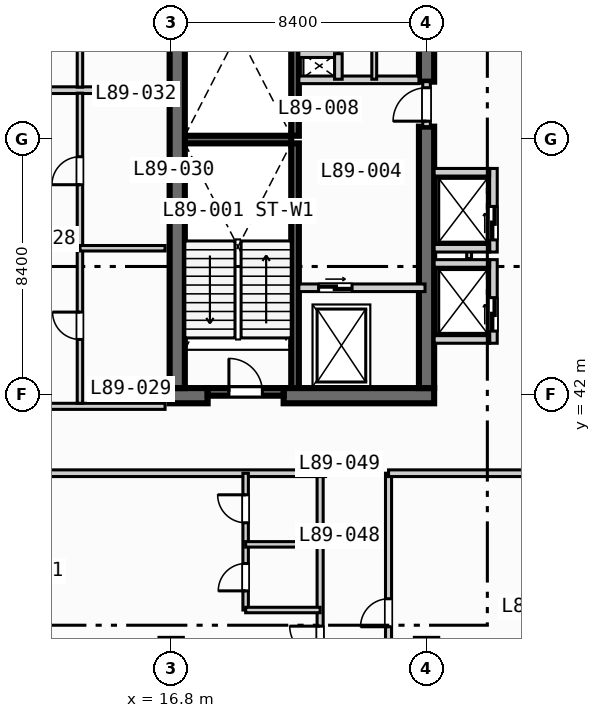
"""IFC4 building model, lengths in metres.
Left out: names, types, materials, properties, quantities, classifications, styles, units other than length and angle.
Written with IfcOpenShell. Run it as: python <this file> out.ifc"""

import sys

from ifc_helpers import new_model, si_unit, direction, frame, frame_2d, origin, place, context, subcontext, project, spatial, rectangle, extrude, element, fill, save


model = new_model("IFC4")
c1 = context("Model", 3, precision=1e-05, world=origin(), true_north=direction((0.0, 1.0)))
c2 = subcontext(c1, "Body", "Model", "MODEL_VIEW")
j1 = project(units=[si_unit("LENGTHUNIT", "METRE"), si_unit("PLANEANGLEUNIT", "RADIAN")], contexts=[c1])
p1 = place(None, origin())
s1 = spatial("IfcSite", under=j1, at=p1, CompositionType="ELEMENT")
p2 = place(p1, origin())
s2 = spatial("IfcBuilding", under=s1, at=p2, CompositionType="ELEMENT")
p3 = place(p2, frame((0.0, 0.0, 359.6)))
s3 = spatial("IfcBuildingStorey", under=s2, at=p3, CompositionType="ELEMENT", Elevation=359.6)
for number, where, z_axis, x_axis in (
    (1, (20.875, 42.2, 0.0), (0.0, 0.0, 1.0), (0.0, 1.0, 0.0)),
    (2, (20.875, 50.5, 0.0), (0.0, 0.0, 1.0), (0.0, 1.0, 0.0)),
):
    element("IfcWall", number, at=place(p3, frame(where, z_axis=z_axis, x_axis=x_axis)), inside=s3, PredefinedType="SOLIDWALL", context=c2, shape_type="SweptSolid", body=[
        extrude(rectangle(XDim=8.05, YDim=0.25, at=frame_2d((4.025, 0.0))), origin(), (0.0, 0.0, 1.0), 3.9),
    ])
p4 = place(p3, frame((17.25, 50.375, 0.0), z_axis=(0.0, 0.0, 1.0), x_axis=(1.0, 0.0, 0.0)))
e3 = element("IfcWall", 3, at=p4, inside=s3, PredefinedType="SOLIDWALL", context=c2, shape_type="SweptSolid", body=[
    extrude(rectangle(XDim=3.5, YDim=0.25, at=frame_2d((1.75, 0.0))), origin(), (0.0, 0.0, 1.0), 3.9),
])
p5 = place(p3, frame((16.75, 41.95, 0.0), z_axis=(0.0, 0.0, 1.0), x_axis=(1.0, 0.0, 0.0)))
e4 = element("IfcWall", 4, at=p5, inside=s3, PredefinedType="SHEAR", context=c2, shape_type="SweptSolid", body=[
    extrude(rectangle(XDim=1.25, YDim=0.5, at=frame_2d((0.625, 0.0))), origin(), (0.0, 0.0, 1.0), 3.9),
])
p6 = place(p3, frame((20.5, 41.95, 0.0), z_axis=(0.0, 0.0, 1.0), x_axis=(1.0, 0.0, 0.0)))
e5 = element("IfcWall", 5, at=p6, inside=s3, PredefinedType="SHEAR", context=c2, shape_type="SweptSolid", body=[
    extrude(rectangle(XDim=4.95, YDim=0.5, at=frame_2d((2.475, 0.0))), origin(), (0.0, 0.0, 1.0), 3.9),
])
p7 = place(p3, frame((17.0, 42.2, 0.0), z_axis=(0.0, 0.0, 1.0), x_axis=(0.0, 1.0, 0.0)))
e6 = element("IfcWall", 6, at=p7, inside=s3, PredefinedType="SHEAR", context=c2, shape_type="SweptSolid", body=[
    extrude(rectangle(XDim=16.35, YDim=0.5, at=frame_2d((8.175, 0.0))), origin(), (0.0, 0.0, 1.0), 3.9),
])
p8 = place(p3, frame((25.2, 42.2, 0.0), z_axis=(0.0, 0.0, 1.0), x_axis=(0.0, 1.0, 0.0)))
e7 = element("IfcWall", 7, at=p8, inside=s3, PredefinedType="SHEAR", context=c2, shape_type="SweptSolid", body=[
    extrude(rectangle(XDim=8.6, YDim=0.5, at=frame_2d((4.3, 0.0))), origin(), (0.0, 0.0, 1.0), 3.9),
])
p9 = place(p3, frame((25.2, 52.28, 0.0), z_axis=(0.0, 0.0, 1.0), x_axis=(0.0, 1.0, 0.0)))
e8 = element("IfcWall", 8, at=p9, inside=s3, PredefinedType="SHEAR", context=c2, shape_type="SweptSolid", body=[
    extrude(rectangle(XDim=1.27, YDim=0.5, at=frame_2d((0.635, 0.0))), origin(), (0.0, 0.0, 1.0), 3.9),
])
p10 = place(p3, frame((18.0, 42.075, 0.0), z_axis=(0.0, 0.0, 1.0), x_axis=(1.0, 0.0, 0.0)))
e9 = element("IfcWall", 9, at=p10, inside=s3, PredefinedType="SOLIDWALL", context=c2, shape_type="SweptSolid", body=[
    extrude(rectangle(XDim=2.5, YDim=0.25, at=frame_2d((1.25, 0.0))), origin(), (0.0, 0.0, 1.0), 3.9),
])
p11 = place(p10, frame((0.7, 0.0, 0.0)))
e10 = element("IfcOpeningElement", 10, at=p11, cuts=e9, PredefinedType="OPENING", context=c2, shape_type="SweptSolid", body=[
    extrude(rectangle(XDim=1.1, YDim=2.15, at=frame_2d((0.55, 1.075))), frame((0.0, 0.135, 0.0), z_axis=(0.0, -1.0, 0.0), x_axis=(1.0, 0.0, 0.0)), (0.0, 0.0, 1.0), 0.27),
])
p12 = place(p3, frame((21.0, 45.5, 0.0), z_axis=(0.0, 0.0, 1.0), x_axis=(1.0, 0.0, 0.0)))
e11 = element("IfcWall", 11, at=p12, inside=s3, PredefinedType="SOLIDWALL", context=c2, shape_type="SweptSolid", body=[
    extrude(rectangle(XDim=4.15, YDim=0.25, at=frame_2d((2.075, 0.0))), origin(), (0.0, 0.0, 1.0), 3.9),
])
p13 = place(p12, frame((0.65, 0.0, 0.0)))
e12 = element("IfcOpeningElement", 12, at=p13, cuts=e11, PredefinedType="OPENING", context=c2, shape_type="SweptSolid", body=[
    extrude(rectangle(XDim=1.1, YDim=2.15, at=frame_2d((0.55, 1.075))), frame((0.0, 0.135, 0.0), z_axis=(0.0, -1.0, 0.0), x_axis=(1.0, 0.0, 0.0)), (0.0, 0.0, 1.0), 0.27),
])
p14 = place(p3, frame((25.2, 50.8, 0.0), z_axis=(0.0, 0.0, 1.0), x_axis=(0.0, 1.0, 0.0)))
e13 = element("IfcWall", 13, at=p14, inside=s3, PredefinedType="SOLIDWALL", context=c2, shape_type="SweptSolid", body=[
    extrude(rectangle(XDim=1.48, YDim=0.25, at=frame_2d((0.74, 0.0))), origin(), (0.0, 0.0, 1.0), 3.9),
])
p15 = place(p14, frame((0.18, 0.0, 0.0)))
e14 = element("IfcOpeningElement", 14, at=p15, cuts=e13, PredefinedType="OPENING", context=c2, shape_type="SweptSolid", body=[
    extrude(rectangle(XDim=1.1, YDim=2.15, at=frame_2d((0.55, 1.075))), frame((0.0, 0.135, 0.0), z_axis=(0.0, -1.0, 0.0), x_axis=(1.0, 0.0, 0.0)), (0.0, 0.0, 1.0), 0.27),
])
p16 = place(p3, frame((21.0, 52.34, 0.0), z_axis=(0.0, 0.0, 1.0), x_axis=(1.0, 0.0, 0.0)))
e15 = element("IfcWall", 15, at=p16, inside=s3, PredefinedType="SOLIDWALL", context=c2, shape_type="SweptSolid", body=[
    extrude(rectangle(XDim=3.95, YDim=0.25, at=frame_2d((1.975, 0.0))), origin(), (0.0, 0.0, 1.0), 3.9),
])
p17 = place(p3, frame((21.0, 53.2, 0.0), z_axis=(0.0, 0.0, 1.0), x_axis=(1.0, 0.0, 0.0)))
e16 = element("IfcWall", 16, at=p17, inside=s3, PredefinedType="SOLIDWALL", context=c2, shape_type="SweptSolid", body=[
    extrude(rectangle(XDim=1.3, YDim=0.25, at=frame_2d((0.65, 0.0))), origin(), (0.0, 0.0, 1.0), 3.9),
])
p18 = place(p3, frame((22.3, 52.36, 0.0), z_axis=(0.0, 0.0, 1.0), x_axis=(0.0, 1.0, 0.0)))
e17 = element("IfcWall", 17, at=p18, inside=s3, PredefinedType="SOLIDWALL", context=c2, shape_type="SweptSolid", body=[
    extrude(rectangle(XDim=0.84, YDim=0.25, at=frame_2d((0.42, 0.0))), origin(), (0.0, 0.0, 1.0), 3.9),
])
p19 = place(p3, frame((23.48, 52.36, 0.0), z_axis=(0.0, 0.0, 1.0), x_axis=(0.0, 1.0, 0.0)))
e18 = element("IfcWall", 18, at=p19, inside=s3, PredefinedType="PARTITIONING", context=c2, shape_type="SweptSolid", body=[
    extrude(rectangle(XDim=1.1, YDim=0.16, at=frame_2d((0.55, 0.0))), origin(), (0.0, 0.0, 1.0), 3.9),
])
p20 = place(p3, frame((27.4, 43.675, 0.0), z_axis=(0.0, 0.0, 1.0), x_axis=(0.0, 1.0, 0.0)))
e19 = element("IfcWall", 19, at=p20, inside=s3, PredefinedType="SOLIDWALL", context=c2, shape_type="SweptSolid", body=[
    extrude(rectangle(XDim=2.75, YDim=0.25, at=frame_2d((1.375, 0.0))), origin(), (0.0, 0.0, 1.0), 3.9),
])
p21 = place(p20, frame((0.4, 0.0, 0.0)))
e20 = element("IfcOpeningElement", 20, at=p21, cuts=e19, PredefinedType="OPENING", context=c2, shape_type="SweptSolid", body=[
    extrude(rectangle(XDim=1.1, YDim=2.15, at=frame_2d((0.55, 1.075))), frame((0.0, 0.135, 0.0), z_axis=(0.0, -1.0, 0.0), x_axis=(1.0, 0.0, 0.0)), (0.0, 0.0, 1.0), 0.27),
])
for number, where, z_axis, x_axis in (
    (21, (25.45, 43.8, 0.0), (0.0, 0.0, 1.0), (1.0, 0.0, 0.0)),
    (22, (25.45, 46.3, 0.0), (0.0, 0.0, 1.0), (1.0, 0.0, 0.0)),
):
    element("IfcWall", number, at=place(p3, frame(where, z_axis=z_axis, x_axis=x_axis)), inside=s3, PredefinedType="SOLIDWALL", context=c2, shape_type="SweptSolid", body=[
        extrude(rectangle(XDim=1.825, YDim=0.25, at=frame_2d((0.913, 0.0))), origin(), (0.0, 0.0, 1.0), 3.9),
    ])
p22 = place(p3, frame((26.6, 46.46, 0.0), z_axis=(0.0, 0.0, 1.0), x_axis=(0.0, 1.0, 0.0)))
e23 = element("IfcWall", 23, at=p22, inside=s3, PredefinedType="PARTITIONING", context=c2, shape_type="SweptSolid", body=[
    extrude(rectangle(XDim=0.88, YDim=0.16, at=frame_2d((0.44, 0.0))), origin(), (0.0, 0.0, 1.0), 3.9),
])
p23 = place(p3, frame((27.4, 46.675, 0.0), z_axis=(0.0, 0.0, 1.0), x_axis=(0.0, 1.0, 0.0)))
e24 = element("IfcWall", 24, at=p23, inside=s3, PredefinedType="SOLIDWALL", context=c2, shape_type="SweptSolid", body=[
    extrude(rectangle(XDim=2.75, YDim=0.25, at=frame_2d((1.375, 0.0))), origin(), (0.0, 0.0, 1.0), 3.9),
])
p24 = place(p23, frame((0.4, 0.0, 0.0)))
e25 = element("IfcOpeningElement", 25, at=p24, cuts=e24, PredefinedType="OPENING", context=c2, shape_type="SweptSolid", body=[
    extrude(rectangle(XDim=1.1, YDim=2.15, at=frame_2d((0.55, 1.075))), frame((0.0, 0.135, 0.0), z_axis=(0.0, -1.0, 0.0), x_axis=(1.0, 0.0, 0.0)), (0.0, 0.0, 1.0), 0.27),
])
for number, where, z_axis, x_axis in (
    (26, (25.45, 46.8, 0.0), (0.0, 0.0, 1.0), (1.0, 0.0, 0.0)),
    (27, (25.45, 49.3, 0.0), (0.0, 0.0, 1.0), (1.0, 0.0, 0.0)),
):
    element("IfcWall", number, at=place(p3, frame(where, z_axis=z_axis, x_axis=x_axis)), inside=s3, PredefinedType="SOLIDWALL", context=c2, shape_type="SweptSolid", body=[
        extrude(rectangle(XDim=1.825, YDim=0.25, at=frame_2d((0.913, 0.0))), origin(), (0.0, 0.0, 1.0), 3.9),
    ])
p25 = place(p3, frame((23.95, 30.6, 0.0), z_axis=(0.0, 0.0, 1.0), x_axis=(0.0, 1.0, 0.0)))
e28 = element("IfcWall", 28, at=p25, inside=s3, PredefinedType="PARTITIONING", context=c2, shape_type="SweptSolid", body=[
    extrude(rectangle(XDim=8.8, YDim=0.2, at=frame_2d((4.4, 0.0))), origin(), (0.0, 0.0, 1.0), 3.9),
])
p26 = place(p25, frame((3.75, 0.0, 0.0)))
e29 = element("IfcOpeningElement", 29, at=p26, cuts=e28, PredefinedType="OPENING", context=c2, shape_type="SweptSolid", body=[
    extrude(rectangle(XDim=0.92, YDim=2.1, at=frame_2d((0.46, 1.05))), frame((0.0, 0.11, 0.0), z_axis=(0.0, -1.0, 0.0), x_axis=(1.0, 0.0, 0.0)), (0.0, 0.0, 1.0), 0.22),
])
p27 = place(p3, frame((23.95, 39.4, 0.0), z_axis=(0.0, 0.0, 1.0), x_axis=(1.0, 0.0, 0.0)))
e30 = element("IfcWall", 30, at=p27, inside=s3, PredefinedType="PARTITIONING", context=c2, shape_type="SweptSolid", body=[
    extrude(rectangle(XDim=9.35, YDim=0.22, at=frame_2d((4.675, 0.0))), origin(), (0.0, 0.0, 1.0), 3.9),
])
p28 = place(p3, frame((8.65, 41.6, 0.0), z_axis=(0.0, 0.0, 1.0), x_axis=(1.0, 0.0, 0.0)))
e31 = element("IfcWall", 31, at=p28, inside=s3, PredefinedType="PARTITIONING", context=c2, shape_type="SweptSolid", body=[
    extrude(rectangle(XDim=7.95, YDim=0.2, at=frame_2d((3.975, 0.0))), origin(), (0.0, 0.0, 1.0), 3.9),
])
p29 = place(p28, frame((2.0, 0.0, 0.0)))
e32 = element("IfcOpeningElement", 32, at=p29, cuts=e31, PredefinedType="OPENING", context=c2, shape_type="SweptSolid", body=[
    extrude(rectangle(XDim=1.0, YDim=2.15, at=frame_2d((0.5, 1.075))), frame((0.0, 0.11, 0.0), z_axis=(0.0, -1.0, 0.0), x_axis=(1.0, 0.0, 0.0)), (0.0, 0.0, 1.0), 0.22),
])
p30 = place(p3, frame((8.65, 52.0, 0.0), z_axis=(0.0, 0.0, 1.0), x_axis=(1.0, 0.0, 0.0)))
e33 = element("IfcWall", 33, at=p30, inside=s3, PredefinedType="PARTITIONING", context=c2, shape_type="SweptSolid", body=[
    extrude(rectangle(XDim=7.95, YDim=0.22, at=frame_2d((3.975, 0.0))), origin(), (0.0, 0.0, 1.0), 3.9),
])
p31 = place(p3, frame((13.8, 41.7, 0.0), z_axis=(0.0, 0.0, 1.0), x_axis=(0.0, 1.0, 0.0)))
e34 = element("IfcWall", 34, at=p31, inside=s3, PredefinedType="PLUMBINGWALL", context=c2, shape_type="SweptSolid", body=[
    extrude(rectangle(XDim=10.2, YDim=0.18, at=frame_2d((5.1, 0.0))), origin(), (0.0, 0.0, 1.0), 3.9),
])
p32 = place(p31, frame((2.1, 0.0, 0.0)))
e35 = element("IfcOpeningElement", 35, at=p32, cuts=e34, PredefinedType="OPENING", context=c2, shape_type="SweptSolid", body=[
    extrude(rectangle(XDim=0.9, YDim=2.1, at=frame_2d((0.45, 1.05))), frame((0.0, 0.1, 0.0), z_axis=(0.0, -1.0, 0.0), x_axis=(1.0, 0.0, 0.0)), (0.0, 0.0, 1.0), 0.2),
])
p33 = place(p31, frame((7.19, 0.0, 0.0)))
e36 = element("IfcOpeningElement", 36, at=p33, cuts=e34, PredefinedType="OPENING", context=c2, shape_type="SweptSolid", body=[
    extrude(rectangle(XDim=0.92, YDim=2.1, at=frame_2d((0.46, 1.05))), frame((0.0, 0.1, 0.0), z_axis=(0.0, -1.0, 0.0), x_axis=(1.0, 0.0, 0.0)), (0.0, 0.0, 1.0), 0.2),
])
p34 = place(p3, frame((13.8, 46.8, 0.0), z_axis=(0.0, 0.0, 1.0), x_axis=(1.0, 0.0, 0.0)))
e37 = element("IfcWall", 37, at=p34, inside=s3, PredefinedType="PLUMBINGWALL", context=c2, shape_type="SweptSolid", body=[
    extrude(rectangle(XDim=2.8, YDim=0.18, at=frame_2d((1.4, 0.0))), origin(), (0.0, 0.0, 1.0), 3.9),
])
p35 = place(p3, frame((13.8, 52.1, 0.0), z_axis=(0.0, 0.0, 1.0), x_axis=(0.0, 1.0, 0.0)))
e38 = element("IfcWall", 38, at=p35, inside=s3, PredefinedType="PLUMBINGWALL", context=c2, shape_type="SweptSolid", body=[
    extrude(rectangle(XDim=6.8, YDim=0.18, at=frame_2d((3.4, 0.0))), origin(), (0.0, 0.0, 1.0), 3.9),
])
p36 = place(p35, frame((1.25, 0.0, 0.0)))
e39 = element("IfcOpeningElement", 39, at=p36, cuts=e38, PredefinedType="OPENING", context=c2, shape_type="SweptSolid", body=[
    extrude(rectangle(XDim=0.9, YDim=2.1, at=frame_2d((0.45, 1.05))), frame((0.0, 0.1, 0.0), z_axis=(0.0, -1.0, 0.0), x_axis=(1.0, 0.0, 0.0)), (0.0, 0.0, 1.0), 0.2),
])
p37 = place(p35, frame((4.64, 0.0, 0.0)))
e40 = element("IfcOpeningElement", 40, at=p37, cuts=e38, PredefinedType="OPENING", context=c2, shape_type="SweptSolid", body=[
    extrude(rectangle(XDim=0.92, YDim=2.1, at=frame_2d((0.46, 1.05))), frame((0.0, 0.1, 0.0), z_axis=(0.0, -1.0, 0.0), x_axis=(1.0, 0.0, 0.0)), (0.0, 0.0, 1.0), 0.2),
])
p38 = place(p3, frame((21.7, 30.65, 0.0), z_axis=(0.0, 0.0, 1.0), x_axis=(0.0, 1.0, 0.0)))
e41 = element("IfcWall", 41, at=p38, inside=s3, PredefinedType="PARTITIONING", context=c2, shape_type="SweptSolid", body=[
    extrude(rectangle(XDim=8.75, YDim=0.2, at=frame_2d((4.375, 0.0))), origin(), (0.0, 0.0, 1.0), 3.9),
])
p39 = place(p38, frame((2.72, 0.0, 0.0)))
e42 = element("IfcOpeningElement", 42, at=p39, cuts=e41, PredefinedType="OPENING", context=c2, shape_type="SweptSolid", body=[
    extrude(rectangle(XDim=1.0, YDim=2.15, at=frame_2d((0.5, 1.075))), frame((0.0, 0.11, 0.0), z_axis=(0.0, -1.0, 0.0), x_axis=(1.0, 0.0, 0.0)), (0.0, 0.0, 1.0), 0.22),
])
p40 = place(p3, frame((8.6, 39.4, 0.0), z_axis=(0.0, 0.0, 1.0), x_axis=(1.0, 0.0, 0.0)))
e43 = element("IfcWall", 43, at=p40, inside=s3, PredefinedType="PARTITIONING", context=c2, shape_type="SweptSolid", body=[
    extrude(rectangle(XDim=13.28, YDim=0.22, at=frame_2d((6.64, 0.0))), origin(), (0.0, 0.0, 1.0), 3.9),
])
p41 = place(p3, frame((19.25, 34.9, 0.0), z_axis=(0.0, 0.0, 1.0), x_axis=(0.0, 1.0, 0.0)))
e44 = element("IfcWall", 44, at=p41, inside=s3, PredefinedType="PLUMBINGWALL", context=c2, shape_type="SweptSolid", body=[
    extrude(rectangle(XDim=4.5, YDim=0.18, at=frame_2d((2.25, 0.0))), origin(), (0.0, 0.0, 1.0), 3.9),
])
p42 = place(p41, frame((0.63, 0.0, 0.0)))
e45 = element("IfcOpeningElement", 45, at=p42, cuts=e44, PredefinedType="OPENING", context=c2, shape_type="SweptSolid", body=[
    extrude(rectangle(XDim=0.9, YDim=2.1, at=frame_2d((0.45, 1.05))), frame((0.0, 0.1, 0.0), z_axis=(0.0, -1.0, 0.0), x_axis=(1.0, 0.0, 0.0)), (0.0, 0.0, 1.0), 0.2),
])
p43 = place(p41, frame((2.87, 0.0, 0.0)))
e46 = element("IfcOpeningElement", 46, at=p43, cuts=e44, PredefinedType="OPENING", context=c2, shape_type="SweptSolid", body=[
    extrude(rectangle(XDim=0.92, YDim=2.1, at=frame_2d((0.46, 1.05))), frame((0.0, 0.1, 0.0), z_axis=(0.0, -1.0, 0.0), x_axis=(1.0, 0.0, 0.0)), (0.0, 0.0, 1.0), 0.2),
])
for number, where, z_axis, x_axis in (
    (47, (19.25, 34.9, 0.0), (0.0, 0.0, 1.0), (1.0, 0.0, 0.0)),
    (48, (19.25, 37.06, 0.0), (0.0, 0.0, 1.0), (1.0, 0.0, 0.0)),
):
    element("IfcWall", number, at=place(p3, frame(where, z_axis=z_axis, x_axis=x_axis)), inside=s3, PredefinedType="PLUMBINGWALL", context=c2, shape_type="SweptSolid", body=[
        extrude(rectangle(XDim=2.45, YDim=0.18, at=frame_2d((1.225, 0.0))), origin(), (0.0, 0.0, 1.0), 3.9),
    ])
p44 = place(p11, origin())
e49 = element("IfcDoor", 49, at=p44, inside=s3, OperationType="SINGLE_SWING_LEFT", PredefinedType="DOOR", context=c2, shape_type="SweptSolid", body=[
    extrude(rectangle(XDim=1.1, YDim=2.15, at=frame_2d((0.55, 1.075))), frame((0.0, 0.025, 0.0), z_axis=(0.0, -1.0, 0.0), x_axis=(1.0, 0.0, 0.0)), (0.0, 0.0, 1.0), 0.05),
])
fill(e10, e49)
p45 = place(p13, origin())
e50 = element("IfcDoor", 50, at=p45, inside=s3, OperationType="SLIDING_TO_LEFT", PredefinedType="DOOR", context=c2, shape_type="SweptSolid", body=[
    extrude(rectangle(XDim=1.1, YDim=2.15, at=frame_2d((0.55, 1.075))), frame((0.0, 0.025, 0.0), z_axis=(0.0, -1.0, 0.0), x_axis=(1.0, 0.0, 0.0)), (0.0, 0.0, 1.0), 0.05),
])
fill(e12, e50)
p46 = place(p15, origin())
e51 = element("IfcDoor", 51, at=p46, inside=s3, OperationType="SINGLE_SWING_LEFT", PredefinedType="DOOR", context=c2, shape_type="SweptSolid", body=[
    extrude(rectangle(XDim=1.1, YDim=2.15, at=frame_2d((0.55, 1.075))), frame((0.0, 0.025, 0.0), z_axis=(0.0, -1.0, 0.0), x_axis=(1.0, 0.0, 0.0)), (0.0, 0.0, 1.0), 0.05),
])
fill(e14, e51)
p47 = place(p21, origin())
e52 = element("IfcDoor", 52, at=p47, inside=s3, OperationType="SLIDING_TO_LEFT", PredefinedType="DOOR", context=c2, shape_type="SweptSolid", body=[
    extrude(rectangle(XDim=1.1, YDim=2.15, at=frame_2d((0.55, 1.075))), frame((0.0, 0.025, 0.0), z_axis=(0.0, -1.0, 0.0), x_axis=(1.0, 0.0, 0.0)), (0.0, 0.0, 1.0), 0.05),
])
fill(e20, e52)
p48 = place(p24, origin())
e53 = element("IfcDoor", 53, at=p48, inside=s3, OperationType="SLIDING_TO_LEFT", PredefinedType="DOOR", context=c2, shape_type="SweptSolid", body=[
    extrude(rectangle(XDim=1.1, YDim=2.15, at=frame_2d((0.55, 1.075))), frame((0.0, 0.025, 0.0), z_axis=(0.0, -1.0, 0.0), x_axis=(1.0, 0.0, 0.0)), (0.0, 0.0, 1.0), 0.05),
])
fill(e25, e53)
p49 = place(p26, origin())
e54 = element("IfcDoor", 54, at=p49, inside=s3, OperationType="SINGLE_SWING_LEFT", PredefinedType="DOOR", context=c2, shape_type="SweptSolid", body=[
    extrude(rectangle(XDim=0.92, YDim=2.1, at=frame_2d((0.46, 1.05))), frame((0.0, 0.025, 0.0), z_axis=(0.0, -1.0, 0.0), x_axis=(1.0, 0.0, 0.0)), (0.0, 0.0, 1.0), 0.05),
])
fill(e29, e54)
p50 = place(p32, origin())
e55 = element("IfcDoor", 55, at=p50, inside=s3, OperationType="SINGLE_SWING_RIGHT", PredefinedType="DOOR", context=c2, shape_type="SweptSolid", body=[
    extrude(rectangle(XDim=0.9, YDim=2.1, at=frame_2d((0.45, 1.05))), frame((0.0, 0.025, 0.0), z_axis=(0.0, -1.0, 0.0), x_axis=(1.0, 0.0, 0.0)), (0.0, 0.0, 1.0), 0.05),
])
fill(e35, e55)
p51 = place(p33, origin())
e56 = element("IfcDoor", 56, at=p51, inside=s3, OperationType="SINGLE_SWING_LEFT", PredefinedType="DOOR", context=c2, shape_type="SweptSolid", body=[
    extrude(rectangle(XDim=0.92, YDim=2.1, at=frame_2d((0.46, 1.05))), frame((0.0, 0.025, 0.0), z_axis=(0.0, -1.0, 0.0), x_axis=(1.0, 0.0, 0.0)), (0.0, 0.0, 1.0), 0.05),
])
fill(e36, e56)
p52 = place(p39, origin())
e57 = element("IfcDoor", 57, at=p52, inside=s3, OperationType="SINGLE_SWING_RIGHT", PredefinedType="DOOR", context=c2, shape_type="SweptSolid", body=[
    extrude(rectangle(XDim=1.0, YDim=2.15, at=frame_2d((0.5, 1.075))), frame((0.0, 0.025, 0.0), z_axis=(0.0, -1.0, 0.0), x_axis=(1.0, 0.0, 0.0)), (0.0, 0.0, 1.0), 0.05),
])
fill(e42, e57)
p53 = place(p42, origin())
e58 = element("IfcDoor", 58, at=p53, inside=s3, OperationType="SINGLE_SWING_LEFT", PredefinedType="DOOR", context=c2, shape_type="SweptSolid", body=[
    extrude(rectangle(XDim=0.9, YDim=2.1, at=frame_2d((0.45, 1.05))), frame((0.0, 0.025, 0.0), z_axis=(0.0, -1.0, 0.0), x_axis=(1.0, 0.0, 0.0)), (0.0, 0.0, 1.0), 0.05),
])
fill(e45, e58)
p54 = place(p43, origin())
e59 = element("IfcDoor", 59, at=p54, inside=s3, OperationType="SINGLE_SWING_RIGHT", PredefinedType="DOOR", context=c2, shape_type="SweptSolid", body=[
    extrude(rectangle(XDim=0.92, YDim=2.1, at=frame_2d((0.46, 1.05))), frame((0.0, 0.025, 0.0), z_axis=(0.0, -1.0, 0.0), x_axis=(1.0, 0.0, 0.0)), (0.0, 0.0, 1.0), 0.05),
])
fill(e46, e59)
save(model, sys.argv[1])
